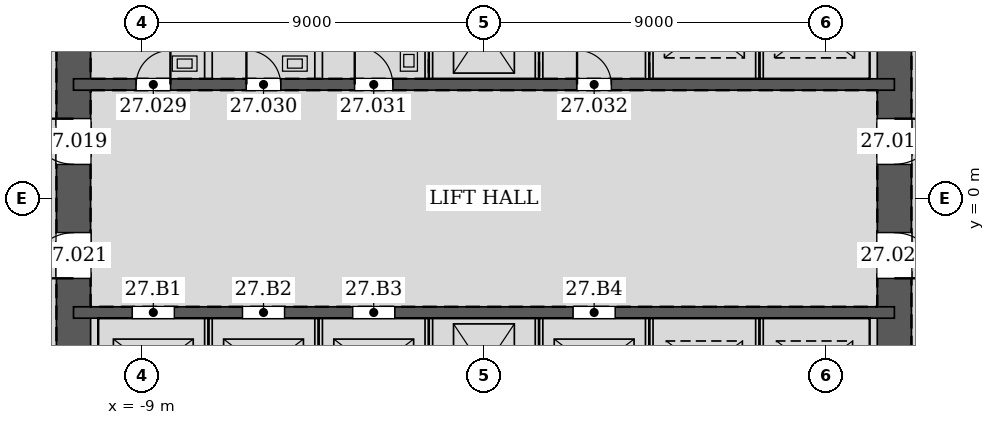
"""IFC4 building model, lengths in metres.
Left out: names, types, materials, properties, quantities, classifications, styles, units other than length and angle.
Written with IfcOpenShell. Run it as: python <this file> out.ifc"""

import sys

from ifc_helpers import new_model, si_unit, direction, frame, frame_2d, origin, place, context, subcontext, project, spatial, rectangle, extrude, element, fill, save


model = new_model("IFC4")
c1 = context("Model", 3, precision=1e-05, world=origin(), true_north=direction((0.0, 1.0)))
c2 = subcontext(c1, "Body", "Model", "MODEL_VIEW")
j1 = project(units=[si_unit("LENGTHUNIT", "METRE"), si_unit("PLANEANGLEUNIT", "RADIAN")], contexts=[c1])
p1 = place(None, origin())
s1 = spatial("IfcSite", under=j1, at=p1, CompositionType="ELEMENT")
p2 = place(p1, origin())
s2 = spatial("IfcBuilding", under=s1, at=p2, CompositionType="ELEMENT")
p3 = place(p2, frame((0.0, 0.0, 121.8)))
s3 = spatial("IfcBuildingStorey", under=s2, at=p3, CompositionType="ELEMENT", Elevation=121.8)
p4 = place(p3, frame((10.8, -10.8, 0.0), z_axis=(0.0, 0.0, 1.0), x_axis=(0.0, 1.0, 0.0)))
e1 = element("IfcWall", 1, at=p4, inside=s3, PredefinedType="SOLIDWALL", context=c2, shape_type="SweptSolid", body=[
    extrude(rectangle(XDim=21.6, YDim=0.9, at=frame_2d((10.8, 0.0))), origin(), (0.0, 0.0, 1.0), 4.2),
])
p5 = place(p4, frame((11.7, 0.0, 0.0)))
e2 = element("IfcOpeningElement", 2, at=p5, cuts=e1, PredefinedType="OPENING", context=c2, shape_type="SweptSolid", body=[
    extrude(rectangle(XDim=1.2, YDim=2.1, at=frame_2d((0.6, 1.05))), frame((0.0, 0.46, 0.0), z_axis=(0.0, -1.0, 0.0), x_axis=(1.0, 0.0, 0.0)), (0.0, 0.0, 1.0), 0.92),
])
p6 = place(p4, frame((8.7, 0.0, 0.0)))
e3 = element("IfcOpeningElement", 3, at=p6, cuts=e1, PredefinedType="OPENING", context=c2, shape_type="SweptSolid", body=[
    extrude(rectangle(XDim=1.2, YDim=2.1, at=frame_2d((0.6, 1.05))), frame((0.0, 0.46, 0.0), z_axis=(0.0, -1.0, 0.0), x_axis=(1.0, 0.0, 0.0)), (0.0, 0.0, 1.0), 0.92),
])
p7 = place(p3, frame((-10.8, 10.8, 0.0), z_axis=(0.0, 0.0, 1.0), x_axis=(0.0, -1.0, 0.0)))
e4 = element("IfcWall", 4, at=p7, inside=s3, PredefinedType="SOLIDWALL", context=c2, shape_type="SweptSolid", body=[
    extrude(rectangle(XDim=21.6, YDim=0.9, at=frame_2d((10.8, 0.0))), origin(), (0.0, 0.0, 1.0), 4.2),
])
p8 = place(p7, frame((8.7, 0.0, 0.0)))
e5 = element("IfcOpeningElement", 5, at=p8, cuts=e4, PredefinedType="OPENING", context=c2, shape_type="SweptSolid", body=[
    extrude(rectangle(XDim=1.2, YDim=2.1, at=frame_2d((0.6, 1.05))), frame((0.0, 0.46, 0.0), z_axis=(0.0, -1.0, 0.0), x_axis=(1.0, 0.0, 0.0)), (0.0, 0.0, 1.0), 0.92),
])
p9 = place(p7, frame((11.7, 0.0, 0.0)))
e6 = element("IfcOpeningElement", 6, at=p9, cuts=e4, PredefinedType="OPENING", context=c2, shape_type="SweptSolid", body=[
    extrude(rectangle(XDim=1.2, YDim=2.1, at=frame_2d((0.6, 1.05))), frame((0.0, 0.46, 0.0), z_axis=(0.0, -1.0, 0.0), x_axis=(1.0, 0.0, 0.0)), (0.0, 0.0, 1.0), 0.92),
])
p10 = place(p3, frame((-10.8, 3.0, 0.0), z_axis=(0.0, 0.0, 1.0), x_axis=(1.0, 0.0, 0.0)))
e7 = element("IfcWall", 7, at=p10, inside=s3, PredefinedType="SOLIDWALL", context=c2, shape_type="SweptSolid", body=[
    extrude(rectangle(XDim=21.6, YDim=0.3, at=frame_2d((10.8, 0.0))), origin(), (0.0, 0.0, 1.0), 4.2),
])
p11 = place(p10, frame((1.65, 0.0, 0.0)))
e8 = element("IfcOpeningElement", 8, at=p11, cuts=e7, PredefinedType="OPENING", context=c2, shape_type="SweptSolid", body=[
    extrude(rectangle(XDim=0.9, YDim=2.1, at=frame_2d((0.45, 1.05))), frame((0.0, 0.16, 0.0), z_axis=(0.0, -1.0, 0.0), x_axis=(1.0, 0.0, 0.0)), (0.0, 0.0, 1.0), 0.32),
])
p12 = place(p10, frame((4.55, 0.0, 0.0)))
e9 = element("IfcOpeningElement", 9, at=p12, cuts=e7, PredefinedType="OPENING", context=c2, shape_type="SweptSolid", body=[
    extrude(rectangle(XDim=0.9, YDim=2.1, at=frame_2d((0.45, 1.05))), frame((0.0, 0.16, 0.0), z_axis=(0.0, -1.0, 0.0), x_axis=(1.0, 0.0, 0.0)), (0.0, 0.0, 1.0), 0.32),
])
p13 = place(p10, frame((7.4, 0.0, 0.0)))
e10 = element("IfcOpeningElement", 10, at=p13, cuts=e7, PredefinedType="OPENING", context=c2, shape_type="SweptSolid", body=[
    extrude(rectangle(XDim=1.0, YDim=2.1, at=frame_2d((0.5, 1.05))), frame((0.0, 0.16, 0.0), z_axis=(0.0, -1.0, 0.0), x_axis=(1.0, 0.0, 0.0)), (0.0, 0.0, 1.0), 0.32),
])
p14 = place(p10, frame((13.25, 0.0, 0.0)))
e11 = element("IfcOpeningElement", 11, at=p14, cuts=e7, PredefinedType="OPENING", context=c2, shape_type="SweptSolid", body=[
    extrude(rectangle(XDim=0.9, YDim=2.1, at=frame_2d((0.45, 1.05))), frame((0.0, 0.16, 0.0), z_axis=(0.0, -1.0, 0.0), x_axis=(1.0, 0.0, 0.0)), (0.0, 0.0, 1.0), 0.32),
])
p15 = place(p3, frame((-10.8, -3.0, 0.0), z_axis=(0.0, 0.0, 1.0), x_axis=(1.0, 0.0, 0.0)))
e12 = element("IfcWall", 12, at=p15, inside=s3, PredefinedType="SOLIDWALL", context=c2, shape_type="SweptSolid", body=[
    extrude(rectangle(XDim=21.6, YDim=0.3, at=frame_2d((10.8, 0.0))), origin(), (0.0, 0.0, 1.0), 4.2),
])
p16 = place(p15, frame((1.55, 0.0, 0.0)))
e13 = element("IfcOpeningElement", 13, at=p16, cuts=e12, PredefinedType="OPENING", context=c2, shape_type="SweptSolid", body=[
    extrude(rectangle(XDim=1.1, YDim=2.1, at=frame_2d((0.55, 1.05))), frame((0.0, 0.16, 0.0), z_axis=(0.0, -1.0, 0.0), x_axis=(1.0, 0.0, 0.0)), (0.0, 0.0, 1.0), 0.32),
])
p17 = place(p15, frame((4.45, 0.0, 0.0)))
e14 = element("IfcOpeningElement", 14, at=p17, cuts=e12, PredefinedType="OPENING", context=c2, shape_type="SweptSolid", body=[
    extrude(rectangle(XDim=1.1, YDim=2.1, at=frame_2d((0.55, 1.05))), frame((0.0, 0.16, 0.0), z_axis=(0.0, -1.0, 0.0), x_axis=(1.0, 0.0, 0.0)), (0.0, 0.0, 1.0), 0.32),
])
p18 = place(p15, frame((7.35, 0.0, 0.0)))
e15 = element("IfcOpeningElement", 15, at=p18, cuts=e12, PredefinedType="OPENING", context=c2, shape_type="SweptSolid", body=[
    extrude(rectangle(XDim=1.1, YDim=2.1, at=frame_2d((0.55, 1.05))), frame((0.0, 0.16, 0.0), z_axis=(0.0, -1.0, 0.0), x_axis=(1.0, 0.0, 0.0)), (0.0, 0.0, 1.0), 0.32),
])
p19 = place(p15, frame((13.15, 0.0, 0.0)))
e16 = element("IfcOpeningElement", 16, at=p19, cuts=e12, PredefinedType="OPENING", context=c2, shape_type="SweptSolid", body=[
    extrude(rectangle(XDim=1.1, YDim=2.1, at=frame_2d((0.55, 1.05))), frame((0.0, 0.16, 0.0), z_axis=(0.0, -1.0, 0.0), x_axis=(1.0, 0.0, 0.0)), (0.0, 0.0, 1.0), 0.32),
])
for number, where, z_axis, x_axis in (
    (17, (-7.25, 3.15, 0.0), (0.0, 0.0, 1.0), (0.0, 1.0, 0.0)),
    (18, (-4.35, 3.15, 0.0), (0.0, 0.0, 1.0), (0.0, 1.0, 0.0)),
    (19, (-1.45, 3.15, 0.0), (0.0, 0.0, 1.0), (0.0, 1.0, 0.0)),
    (20, (1.45, 3.15, 0.0), (0.0, 0.0, 1.0), (0.0, 1.0, 0.0)),
    (21, (4.35, 3.15, 0.0), (0.0, 0.0, 1.0), (0.0, 1.0, 0.0)),
):
    element("IfcWall", number, at=place(p3, frame(where, z_axis=z_axis, x_axis=x_axis)), inside=s3, PredefinedType="PARTITIONING", context=c2, shape_type="SweptSolid", body=[
        extrude(rectangle(XDim=2.7, YDim=0.2, at=frame_2d((1.35, 0.0))), origin(), (0.0, 0.0, 1.0), 4.035),
    ])
for number, where, z_axis, x_axis in (
    (22, (7.25, 3.15, 0.0), (0.0, 0.0, 1.0), (0.0, 1.0, 0.0)),
    (23, (-7.25, -5.85, 0.0), (0.0, 0.0, 1.0), (0.0, 1.0, 0.0)),
    (24, (-4.35, -5.85, 0.0), (0.0, 0.0, 1.0), (0.0, 1.0, 0.0)),
    (25, (-1.45, -5.85, 0.0), (0.0, 0.0, 1.0), (0.0, 1.0, 0.0)),
    (26, (1.45, -5.85, 0.0), (0.0, 0.0, 1.0), (0.0, 1.0, 0.0)),
    (27, (4.35, -5.85, 0.0), (0.0, 0.0, 1.0), (0.0, 1.0, 0.0)),
    (28, (7.25, -5.85, 0.0), (0.0, 0.0, 1.0), (0.0, 1.0, 0.0)),
):
    element("IfcWall", number, at=place(p3, frame(where, z_axis=z_axis, x_axis=x_axis)), inside=s3, PredefinedType="PARTITIONING", context=c2, shape_type="SweptSolid", body=[
        extrude(rectangle(XDim=2.7, YDim=0.2, at=frame_2d((1.35, 0.0))), origin(), (0.0, 0.0, 1.0), 4.2),
    ])
p20 = place(p5, frame((1.2, 0.0, 0.0), z_axis=(0.0, 0.0, 1.0), x_axis=(-1.0, 0.0, 0.0)))
e29 = element("IfcDoor", 29, at=p20, inside=s3, OperationType="SINGLE_SWING_LEFT", PredefinedType="DOOR", context=c2, shape_type="SweptSolid", body=[
    extrude(rectangle(XDim=1.2, YDim=2.1, at=frame_2d((0.6, 1.05))), frame((0.0, 0.025, 0.0), z_axis=(0.0, -1.0, 0.0), x_axis=(1.0, 0.0, 0.0)), (0.0, 0.0, 1.0), 0.05),
])
fill(e2, e29)
p21 = place(p8, frame((1.2, 0.0, 0.0), z_axis=(0.0, 0.0, 1.0), x_axis=(-1.0, 0.0, 0.0)))
e30 = element("IfcDoor", 30, at=p21, inside=s3, OperationType="SINGLE_SWING_RIGHT", PredefinedType="DOOR", context=c2, shape_type="SweptSolid", body=[
    extrude(rectangle(XDim=1.2, YDim=2.1, at=frame_2d((0.6, 1.05))), frame((0.0, 0.025, 0.0), z_axis=(0.0, -1.0, 0.0), x_axis=(1.0, 0.0, 0.0)), (0.0, 0.0, 1.0), 0.05),
])
fill(e5, e30)
p22 = place(p6, frame((1.2, 0.0, 0.0), z_axis=(0.0, 0.0, 1.0), x_axis=(-1.0, 0.0, 0.0)))
e31 = element("IfcDoor", 31, at=p22, inside=s3, OperationType="SINGLE_SWING_RIGHT", PredefinedType="DOOR", context=c2, shape_type="SweptSolid", body=[
    extrude(rectangle(XDim=1.2, YDim=2.1, at=frame_2d((0.6, 1.05))), frame((0.0, 0.025, 0.0), z_axis=(0.0, -1.0, 0.0), x_axis=(1.0, 0.0, 0.0)), (0.0, 0.0, 1.0), 0.05),
])
fill(e3, e31)
p23 = place(p9, frame((1.2, 0.0, 0.0), z_axis=(0.0, 0.0, 1.0), x_axis=(-1.0, 0.0, 0.0)))
e32 = element("IfcDoor", 32, at=p23, inside=s3, OperationType="SINGLE_SWING_LEFT", PredefinedType="DOOR", context=c2, shape_type="SweptSolid", body=[
    extrude(rectangle(XDim=1.2, YDim=2.1, at=frame_2d((0.6, 1.05))), frame((0.0, 0.025, 0.0), z_axis=(0.0, -1.0, 0.0), x_axis=(1.0, 0.0, 0.0)), (0.0, 0.0, 1.0), 0.05),
])
fill(e6, e32)
p24 = place(p11, origin())
e33 = element("IfcDoor", 33, at=p24, inside=s3, OperationType="SINGLE_SWING_RIGHT", PredefinedType="DOOR", context=c2, shape_type="SweptSolid", body=[
    extrude(rectangle(XDim=0.9, YDim=2.1, at=frame_2d((0.45, 1.05))), frame((0.0, 0.025, 0.0), z_axis=(0.0, -1.0, 0.0), x_axis=(1.0, 0.0, 0.0)), (0.0, 0.0, 1.0), 0.05),
])
fill(e8, e33)
p25 = place(p12, origin())
e34 = element("IfcDoor", 34, at=p25, inside=s3, OperationType="SINGLE_SWING_LEFT", PredefinedType="DOOR", context=c2, shape_type="SweptSolid", body=[
    extrude(rectangle(XDim=0.9, YDim=2.1, at=frame_2d((0.45, 1.05))), frame((0.0, 0.025, 0.0), z_axis=(0.0, -1.0, 0.0), x_axis=(1.0, 0.0, 0.0)), (0.0, 0.0, 1.0), 0.05),
])
fill(e9, e34)
p26 = place(p13, origin())
e35 = element("IfcDoor", 35, at=p26, inside=s3, OperationType="SINGLE_SWING_LEFT", PredefinedType="DOOR", context=c2, shape_type="SweptSolid", body=[
    extrude(rectangle(XDim=1.0, YDim=2.1, at=frame_2d((0.5, 1.05))), frame((0.0, 0.025, 0.0), z_axis=(0.0, -1.0, 0.0), x_axis=(1.0, 0.0, 0.0)), (0.0, 0.0, 1.0), 0.05),
])
fill(e10, e35)
p27 = place(p14, origin())
e36 = element("IfcDoor", 36, at=p27, inside=s3, OperationType="SINGLE_SWING_LEFT", PredefinedType="DOOR", context=c2, shape_type="SweptSolid", body=[
    extrude(rectangle(XDim=0.9, YDim=2.1, at=frame_2d((0.45, 1.05))), frame((0.0, 0.025, 0.0), z_axis=(0.0, -1.0, 0.0), x_axis=(1.0, 0.0, 0.0)), (0.0, 0.0, 1.0), 0.05),
])
fill(e11, e36)
p28 = place(p16, origin())
e37 = element("IfcDoor", 37, at=p28, inside=s3, OperationType="DOUBLE_DOOR_SLIDING", PredefinedType="DOOR", context=c2, shape_type="SweptSolid", body=[
    extrude(rectangle(XDim=1.1, YDim=2.1, at=frame_2d((0.55, 1.05))), frame((0.0, 0.025, 0.0), z_axis=(0.0, -1.0, 0.0), x_axis=(1.0, 0.0, 0.0)), (0.0, 0.0, 1.0), 0.05),
])
fill(e13, e37)
p29 = place(p17, origin())
e38 = element("IfcDoor", 38, at=p29, inside=s3, OperationType="DOUBLE_DOOR_SLIDING", PredefinedType="DOOR", context=c2, shape_type="SweptSolid", body=[
    extrude(rectangle(XDim=1.1, YDim=2.1, at=frame_2d((0.55, 1.05))), frame((0.0, 0.025, 0.0), z_axis=(0.0, -1.0, 0.0), x_axis=(1.0, 0.0, 0.0)), (0.0, 0.0, 1.0), 0.05),
])
fill(e14, e38)
p30 = place(p18, origin())
e39 = element("IfcDoor", 39, at=p30, inside=s3, OperationType="DOUBLE_DOOR_SLIDING", PredefinedType="DOOR", context=c2, shape_type="SweptSolid", body=[
    extrude(rectangle(XDim=1.1, YDim=2.1, at=frame_2d((0.55, 1.05))), frame((0.0, 0.025, 0.0), z_axis=(0.0, -1.0, 0.0), x_axis=(1.0, 0.0, 0.0)), (0.0, 0.0, 1.0), 0.05),
])
fill(e15, e39)
p31 = place(p19, origin())
e40 = element("IfcDoor", 40, at=p31, inside=s3, OperationType="DOUBLE_DOOR_SLIDING", PredefinedType="DOOR", context=c2, shape_type="SweptSolid", body=[
    extrude(rectangle(XDim=1.1, YDim=2.1, at=frame_2d((0.55, 1.05))), frame((0.0, 0.025, 0.0), z_axis=(0.0, -1.0, 0.0), x_axis=(1.0, 0.0, 0.0)), (0.0, 0.0, 1.0), 0.05),
])
fill(e16, e40)
save(model, sys.argv[1])
